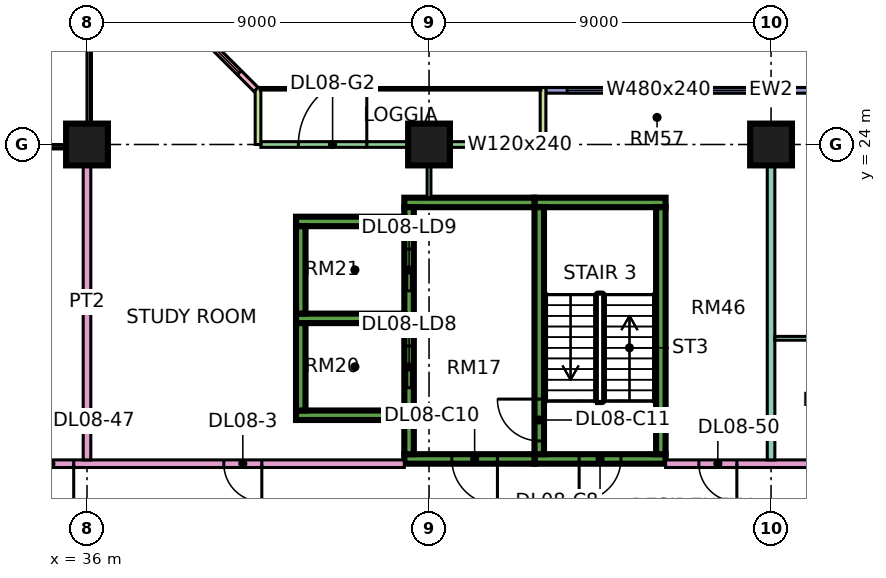
"""IFC4 building model, lengths in metres.
Left out: names, types, materials, properties, quantities, classifications, styles, units other than length and angle.
Written with IfcOpenShell. Run it as: python <this file> out.ifc"""

import sys

from ifc_helpers import new_model, si_unit, direction, frame, frame_2d, origin, origin_2d, place, context, subcontext, project, spatial, rectangle, extrude, element, fill, save


model = new_model("IFC4")
c1 = context("Model", 3, precision=1e-05, world=origin(), true_north=direction((0.0, 1.0)))
c2 = subcontext(c1, "Body", "Model", "MODEL_VIEW")
j1 = project(units=[si_unit("LENGTHUNIT", "METRE"), si_unit("PLANEANGLEUNIT", "RADIAN")], contexts=[c1])
p1 = place(None, origin())
s1 = spatial("IfcSite", under=j1, at=p1, CompositionType="ELEMENT")
p2 = place(p1, origin())
s2 = spatial("IfcBuilding", under=s1, at=p2, CompositionType="ELEMENT")
p3 = place(p2, frame((0.0, 0.0, 45.15)))
s3 = spatial("IfcBuildingStorey", under=s2, at=p3, CompositionType="ELEMENT", Elevation=45.15)
for number, where, z_axis, x_axis in (
    (1, (36.0, 24.0, 0.0), (0.0, 0.0, 1.0), (1.0, 0.0, 0.0)),
    (2, (45.0, 24.0, 0.0), (0.0, 0.0, 1.0), (1.0, 0.0, 0.0)),
    (3, (54.0, 24.0, 0.0), (0.0, 0.0, 1.0), (1.0, 0.0, 0.0)),
):
    element("IfcColumn", number, at=place(p3, frame(where, z_axis=z_axis, x_axis=x_axis)), inside=s3, PredefinedType="COLUMN", context=c2, shape_type="SweptSolid", body=[
        extrude(rectangle(XDim=1.1, YDim=1.1, at=origin_2d()), origin(), (0.0, 0.0, 1.0), 3.75),
    ])
p4 = place(p3, frame((47.775, 15.725, 0.0), z_axis=(0.0, 0.0, 1.0), x_axis=(1.0, 0.0, 0.0)))
e4 = element("IfcWall", 4, at=p4, inside=s3, PredefinedType="SHEAR", context=c2, shape_type="SweptSolid", body=[
    extrude(rectangle(XDim=3.45, YDim=0.25, at=frame_2d((1.725, 0.0))), origin(), (0.0, 0.0, 1.0), 3.75),
])
p5 = place(p4, frame((1.175, 0.0, 0.0)))
e5 = element("IfcOpeningElement", 5, at=p5, cuts=e4, PredefinedType="OPENING", context=c2, shape_type="SweptSolid", body=[
    extrude(rectangle(XDim=1.1, YDim=2.2, at=frame_2d((0.55, 1.1))), frame((0.0, 0.135, 0.0), z_axis=(0.0, -1.0, 0.0), x_axis=(1.0, 0.0, 0.0)), (0.0, 0.0, 1.0), 0.27),
])
p6 = place(p3, frame((47.775, 22.475, 0.0), z_axis=(0.0, 0.0, 1.0), x_axis=(1.0, 0.0, 0.0)))
e6 = element("IfcWall", 6, at=p6, inside=s3, PredefinedType="SHEAR", context=c2, shape_type="SweptSolid", body=[
    extrude(rectangle(XDim=3.45, YDim=0.25, at=frame_2d((1.725, 0.0))), origin(), (0.0, 0.0, 1.0), 3.75),
])
p7 = place(p3, frame((47.9, 15.85, 0.0), z_axis=(0.0, 0.0, 1.0), x_axis=(0.0, 1.0, 0.0)))
e7 = element("IfcWall", 7, at=p7, inside=s3, PredefinedType="SHEAR", context=c2, shape_type="SweptSolid", body=[
    extrude(rectangle(XDim=6.5, YDim=0.25, at=frame_2d((3.25, 0.0))), origin(), (0.0, 0.0, 1.0), 3.75),
])
p8 = place(p7, frame((0.35, 0.0, 0.0)))
e8 = element("IfcOpeningElement", 8, at=p8, cuts=e7, PredefinedType="OPENING", context=c2, shape_type="SweptSolid", body=[
    extrude(rectangle(XDim=1.1, YDim=2.2, at=frame_2d((0.55, 1.1))), frame((0.0, 0.135, 0.0), z_axis=(0.0, -1.0, 0.0), x_axis=(1.0, 0.0, 0.0)), (0.0, 0.0, 1.0), 0.27),
])
p9 = place(p3, frame((51.1, 15.85, 0.0), z_axis=(0.0, 0.0, 1.0), x_axis=(0.0, 1.0, 0.0)))
e9 = element("IfcWall", 9, at=p9, inside=s3, PredefinedType="SHEAR", context=c2, shape_type="SweptSolid", body=[
    extrude(rectangle(XDim=6.5, YDim=0.25, at=frame_2d((3.25, 0.0))), origin(), (0.0, 0.0, 1.0), 3.75),
])
p10 = place(p3, frame((44.35, 15.725, 0.0), z_axis=(0.0, 0.0, 1.0), x_axis=(1.0, 0.0, 0.0)))
e10 = element("IfcWall", 10, at=p10, inside=s3, PredefinedType="SHEAR", context=c2, shape_type="SweptSolid", body=[
    extrude(rectangle(XDim=3.425, YDim=0.25, at=frame_2d((1.712, 0.0))), origin(), (0.0, 0.0, 1.0), 3.75),
])
p11 = place(p10, frame((1.25, 0.0, 0.0)))
e11 = element("IfcOpeningElement", 11, at=p11, cuts=e10, PredefinedType="OPENING", context=c2, shape_type="SweptSolid", body=[
    extrude(rectangle(XDim=1.2, YDim=2.2, at=frame_2d((0.6, 1.1))), frame((0.0, 0.135, 0.0), z_axis=(0.0, -1.0, 0.0), x_axis=(1.0, 0.0, 0.0)), (0.0, 0.0, 1.0), 0.27),
])
p12 = place(p3, frame((44.35, 22.475, 0.0), z_axis=(0.0, 0.0, 1.0), x_axis=(1.0, 0.0, 0.0)))
e12 = element("IfcWall", 12, at=p12, inside=s3, PredefinedType="SHEAR", context=c2, shape_type="SweptSolid", body=[
    extrude(rectangle(XDim=3.425, YDim=0.25, at=frame_2d((1.712, 0.0))), origin(), (0.0, 0.0, 1.0), 3.75),
])
p13 = place(p3, frame((44.475, 15.85, 0.0), z_axis=(0.0, 0.0, 1.0), x_axis=(0.0, 1.0, 0.0)))
e13 = element("IfcWall", 13, at=p13, inside=s3, PredefinedType="SHEAR", context=c2, shape_type="SweptSolid", body=[
    extrude(rectangle(XDim=6.5, YDim=0.25, at=frame_2d((3.25, 0.0))), origin(), (0.0, 0.0, 1.0), 3.75),
])
p14 = place(p13, frame((1.75, 0.0, 0.0)))
e14 = element("IfcOpeningElement", 14, at=p14, cuts=e13, PredefinedType="OPENING", context=c2, shape_type="SweptSolid", body=[
    extrude(rectangle(XDim=1.1, YDim=2.2, at=frame_2d((0.55, 1.1))), frame((0.0, 0.135, 0.0), z_axis=(0.0, -1.0, 0.0), x_axis=(1.0, 0.0, 0.0)), (0.0, 0.0, 1.0), 0.27),
])
p15 = place(p13, frame((4.3, 0.0, 0.0)))
e15 = element("IfcOpeningElement", 15, at=p15, cuts=e13, PredefinedType="OPENING", context=c2, shape_type="SweptSolid", body=[
    extrude(rectangle(XDim=1.1, YDim=2.2, at=frame_2d((0.55, 1.1))), frame((0.0, 0.135, 0.0), z_axis=(0.0, -1.0, 0.0), x_axis=(1.0, 0.0, 0.0)), (0.0, 0.0, 1.0), 0.27),
])
for number, where, z_axis, x_axis in (
    (16, (41.5, 16.875, 0.0), (0.0, 0.0, 1.0), (1.0, 0.0, 0.0)),
    (17, (41.5, 19.425, 0.0), (0.0, 0.0, 1.0), (1.0, 0.0, 0.0)),
    (18, (41.5, 21.975, 0.0), (0.0, 0.0, 1.0), (1.0, 0.0, 0.0)),
):
    element("IfcWall", number, at=place(p3, frame(where, z_axis=z_axis, x_axis=x_axis)), inside=s3, PredefinedType="SHEAR", context=c2, shape_type="SweptSolid", body=[
        extrude(rectangle(XDim=2.85, YDim=0.25, at=frame_2d((1.425, 0.0))), origin(), (0.0, 0.0, 1.0), 3.75),
    ])
for number, where, z_axis, x_axis in (
    (19, (41.625, 17.0, 0.0), (0.0, 0.0, 1.0), (0.0, 1.0, 0.0)),
    (20, (41.625, 19.55, 0.0), (0.0, 0.0, 1.0), (0.0, 1.0, 0.0)),
):
    element("IfcWall", number, at=place(p3, frame(where, z_axis=z_axis, x_axis=x_axis)), inside=s3, PredefinedType="SHEAR", context=c2, shape_type="SweptSolid", body=[
        extrude(rectangle(XDim=2.3, YDim=0.25, at=frame_2d((1.15, 0.0))), origin(), (0.0, 0.0, 1.0), 3.75),
    ])
p16 = place(p3, frame((59.925, 25.425, 0.0), z_axis=(0.0, 0.0, 1.0), x_axis=(-1.0, 0.0, 0.0)))
e21 = element("IfcWall", 21, at=p16, inside=s3, PredefinedType="SOLIDWALL", context=c2, shape_type="SweptSolid", body=[
    extrude(rectangle(XDim=11.85, YDim=0.15, at=frame_2d((5.925, 0.0))), origin(), (0.0, 0.0, 1.0), 3.35),
])
p17 = place(p16, frame((1.462, 0.0, 0.45)))
e22 = element("IfcOpeningElement", 22, at=p17, cuts=e21, PredefinedType="OPENING", context=c2, shape_type="SweptSolid", body=[
    extrude(rectangle(XDim=3.0, YDim=2.4, at=frame_2d((1.5, 1.2))), frame((0.0, 0.085, 0.0), z_axis=(0.0, -1.0, 0.0), x_axis=(1.0, 0.0, 0.0)), (0.0, 0.0, 1.0), 0.17),
])
p18 = place(p16, frame((6.488, 0.0, 0.45)))
e23 = element("IfcOpeningElement", 23, at=p18, cuts=e21, PredefinedType="OPENING", context=c2, shape_type="SweptSolid", body=[
    extrude(rectangle(XDim=4.8, YDim=2.4, at=frame_2d((2.4, 1.2))), frame((0.0, 0.085, 0.0), z_axis=(0.0, -1.0, 0.0), x_axis=(1.0, 0.0, 0.0)), (0.0, 0.0, 1.0), 0.17),
])
p19 = place(p3, frame((47.925, 24.0, 0.0), z_axis=(0.0, 0.0, 1.0), x_axis=(-1.0, 0.0, 0.0)))
e24 = element("IfcWall", 24, at=p19, inside=s3, PredefinedType="SOLIDWALL", context=c2, shape_type="SweptSolid", body=[
    extrude(rectangle(XDim=7.35, YDim=0.15, at=frame_2d((3.675, 0.0))), origin(), (0.0, 0.0, 1.0), 3.35),
])
p20 = place(p19, frame((0.538, 0.0, 0.45)))
e25 = element("IfcOpeningElement", 25, at=p20, cuts=e24, PredefinedType="OPENING", context=c2, shape_type="SweptSolid", body=[
    extrude(rectangle(XDim=1.2, YDim=2.4, at=frame_2d((0.6, 1.2))), frame((0.0, 0.085, 0.0), z_axis=(0.0, -1.0, 0.0), x_axis=(1.0, 0.0, 0.0)), (0.0, 0.0, 1.0), 0.17),
])
p21 = place(p19, frame((4.562, 0.0, 0.0)))
e26 = element("IfcOpeningElement", 26, at=p21, cuts=e24, PredefinedType="OPENING", context=c2, shape_type="SweptSolid", body=[
    extrude(rectangle(XDim=1.8, YDim=2.4, at=frame_2d((0.9, 1.2))), frame((0.0, 0.085, 0.0), z_axis=(0.0, -1.0, 0.0), x_axis=(1.0, 0.0, 0.0)), (0.0, 0.0, 1.0), 0.17),
])
for number, where, z_axis, x_axis in (
    (27, (48.0, 25.5, 0.0), (0.0, 0.0, 1.0), (0.0, -1.0, 0.0)),
    (28, (40.5, 25.5, 0.0), (0.0, 0.0, 1.0), (0.0, -1.0, 0.0)),
):
    element("IfcWall", number, at=place(p3, frame(where, z_axis=z_axis, x_axis=x_axis)), inside=s3, PredefinedType="SOLIDWALL", context=c2, shape_type="SweptSolid", body=[
        extrude(rectangle(XDim=1.5, YDim=0.15, at=frame_2d((0.75, 0.0))), origin(), (0.0, 0.0, 1.0), 3.35),
    ])
p22 = place(p3, frame((40.447, 25.447, 0.0), z_axis=(0.0, 0.0, 1.0), x_axis=(-0.707106781187, 0.707106781187, 0.0)))
e29 = element("IfcWall", 29, at=p22, inside=s3, PredefinedType="SOLIDWALL", context=c2, shape_type="SweptSolid", body=[
    extrude(rectangle(XDim=4.243, YDim=0.15, at=frame_2d((2.121, 0.0))), origin(), (0.0, 0.0, 1.0), 3.35),
])
p23 = place(p22, frame((0.621, 0.0, 0.45)))
e30 = element("IfcOpeningElement", 30, at=p23, cuts=e29, PredefinedType="OPENING", context=c2, shape_type="SweptSolid", body=[
    extrude(rectangle(XDim=3.0, YDim=2.4, at=frame_2d((1.5, 1.2))), frame((0.0, 0.085, 0.0), z_axis=(0.0, -1.0, 0.0), x_axis=(1.0, 0.0, 0.0)), (0.0, 0.0, 1.0), 0.17),
])
p24 = place(p3, frame((34.0, 15.6, 0.0), z_axis=(0.0, 0.0, 1.0), x_axis=(1.0, 0.0, 0.0)))
e31 = element("IfcWall", 31, at=p24, inside=s3, PredefinedType="PARTITIONING", context=c2, shape_type="SweptSolid", body=[
    extrude(rectangle(XDim=10.35, YDim=0.2, at=frame_2d((5.175, 0.0))), origin(), (0.0, 0.0, 1.0), 3.35),
])
p25 = place(p24, frame((5.6, 0.0, 0.0)))
e32 = element("IfcOpeningElement", 32, at=p25, cuts=e31, PredefinedType="OPENING", context=c2, shape_type="SweptSolid", body=[
    extrude(rectangle(XDim=1.0, YDim=2.1, at=frame_2d((0.5, 1.05))), frame((0.0, 0.11, 0.0), z_axis=(0.0, -1.0, 0.0), x_axis=(1.0, 0.0, 0.0)), (0.0, 0.0, 1.0), 0.22),
])
p26 = place(p24, frame((0.45, 0.0, 0.0)))
e33 = element("IfcOpeningElement", 33, at=p26, cuts=e31, PredefinedType="OPENING", context=c2, shape_type="SweptSolid", body=[
    extrude(rectangle(XDim=1.2, YDim=2.1, at=frame_2d((0.6, 1.05))), frame((0.0, 0.11, 0.0), z_axis=(0.0, -1.0, 0.0), x_axis=(1.0, 0.0, 0.0)), (0.0, 0.0, 1.0), 0.22),
])
p27 = place(p3, frame((36.0, 15.7, 0.0), z_axis=(0.0, 0.0, 1.0), x_axis=(0.0, 1.0, 0.0)))
e34 = element("IfcWall", 34, at=p27, inside=s3, PredefinedType="PARTITIONING", context=c2, shape_type="SweptSolid", body=[
    extrude(rectangle(XDim=8.3, YDim=0.2, at=frame_2d((4.15, 0.0))), origin(), (0.0, 0.0, 1.0), 3.35),
])
p28 = place(p3, frame((45.0, 22.6, 0.0), z_axis=(0.0, 0.0, 1.0), x_axis=(0.0, 1.0, 0.0)))
e35 = element("IfcWall", 35, at=p28, inside=s3, PredefinedType="PARTITIONING", context=c2, shape_type="SweptSolid", body=[
    extrude(rectangle(XDim=1.326, YDim=0.1, at=frame_2d((0.663, 0.0))), origin(), (0.0, 0.0, 1.0), 3.35),
])
p29 = place(p3, frame((51.225, 15.6, 0.0), z_axis=(0.0, 0.0, 1.0), x_axis=(1.0, 0.0, 0.0)))
e36 = element("IfcWall", 36, at=p29, inside=s3, PredefinedType="PARTITIONING", context=c2, shape_type="SweptSolid", body=[
    extrude(rectangle(XDim=20.701, YDim=0.2, at=frame_2d((10.351, 0.0))), origin(), (0.0, 0.0, 1.0), 3.35),
])
p30 = place(p29, frame((9.875, 0.0, 0.0)))
e37 = element("IfcOpeningElement", 37, at=p30, cuts=e36, PredefinedType="OPENING", context=c2, shape_type="SweptSolid", body=[
    extrude(rectangle(XDim=1.0, YDim=2.1, at=frame_2d((0.5, 1.05))), frame((0.0, 0.11, 0.0), z_axis=(0.0, -1.0, 0.0), x_axis=(1.0, 0.0, 0.0)), (0.0, 0.0, 1.0), 0.22),
])
p31 = place(p29, frame((0.875, 0.0, 0.0)))
e38 = element("IfcOpeningElement", 38, at=p31, cuts=e36, PredefinedType="OPENING", context=c2, shape_type="SweptSolid", body=[
    extrude(rectangle(XDim=1.0, YDim=2.1, at=frame_2d((0.5, 1.05))), frame((0.0, 0.11, 0.0), z_axis=(0.0, -1.0, 0.0), x_axis=(1.0, 0.0, 0.0)), (0.0, 0.0, 1.0), 0.22),
])
p32 = place(p3, frame((54.0, 15.7, 0.0), z_axis=(0.0, 0.0, 1.0), x_axis=(0.0, 1.0, 0.0)))
e39 = element("IfcWall", 39, at=p32, inside=s3, PredefinedType="PARTITIONING", context=c2, shape_type="SweptSolid", body=[
    extrude(rectangle(XDim=8.3, YDim=0.2, at=frame_2d((4.15, 0.0))), origin(), (0.0, 0.0, 1.0), 3.35),
])
p33 = place(p3, frame((54.1, 18.9, 0.0), z_axis=(0.0, 0.0, 1.0), x_axis=(1.0, 0.0, 0.0)))
e40 = element("IfcWall", 40, at=p33, inside=s3, PredefinedType="PARTITIONING", context=c2, shape_type="SweptSolid", body=[
    extrude(rectangle(XDim=5.65, YDim=0.1, at=frame_2d((2.825, 0.0))), origin(), (0.0, 0.0, 1.0), 3.35),
])
p34 = place(p18, origin())
e41 = element("IfcWindow", 41, at=p34, inside=s3, PartitioningType="SINGLE_PANEL", PredefinedType="WINDOW", context=c2, shape_type="SweptSolid", body=[
    extrude(rectangle(XDim=4.8, YDim=2.4, at=frame_2d((2.4, 1.2))), frame((0.0, 0.03, 0.0), z_axis=(0.0, -1.0, 0.0), x_axis=(1.0, 0.0, 0.0)), (0.0, 0.0, 1.0), 0.06),
])
fill(e23, e41)
p35 = place(p20, origin())
e42 = element("IfcWindow", 42, at=p35, inside=s3, PartitioningType="SINGLE_PANEL", PredefinedType="WINDOW", context=c2, shape_type="SweptSolid", body=[
    extrude(rectangle(XDim=1.2, YDim=2.4, at=frame_2d((0.6, 1.2))), frame((0.0, 0.03, 0.0), z_axis=(0.0, -1.0, 0.0), x_axis=(1.0, 0.0, 0.0)), (0.0, 0.0, 1.0), 0.06),
])
fill(e25, e42)
p36 = place(p21, frame((1.8, 0.0, 0.0), z_axis=(0.0, 0.0, 1.0), x_axis=(-1.0, 0.0, 0.0)))
e43 = element("IfcDoor", 43, at=p36, inside=s3, OperationType="DOUBLE_DOOR_SINGLE_SWING", PredefinedType="DOOR", context=c2, shape_type="SweptSolid", body=[
    extrude(rectangle(XDim=1.8, YDim=2.4, at=frame_2d((0.9, 1.2))), frame((0.0, 0.025, 0.0), z_axis=(0.0, -1.0, 0.0), x_axis=(1.0, 0.0, 0.0)), (0.0, 0.0, 1.0), 0.05),
])
fill(e26, e43)
p37 = place(p23, origin())
e44 = element("IfcWindow", 44, at=p37, inside=s3, PartitioningType="SINGLE_PANEL", PredefinedType="WINDOW", context=c2, shape_type="SweptSolid", body=[
    extrude(rectangle(XDim=3.0, YDim=2.4, at=frame_2d((1.5, 1.2))), frame((0.0, 0.03, 0.0), z_axis=(0.0, -1.0, 0.0), x_axis=(1.0, 0.0, 0.0)), (0.0, 0.0, 1.0), 0.06),
])
fill(e30, e44)
p38 = place(p5, frame((1.1, 0.0, 0.0), z_axis=(0.0, 0.0, 1.0), x_axis=(-1.0, 0.0, 0.0)))
e45 = element("IfcDoor", 45, at=p38, inside=s3, OperationType="SINGLE_SWING_LEFT", PredefinedType="DOOR", context=c2, shape_type="SweptSolid", body=[
    extrude(rectangle(XDim=1.1, YDim=2.2, at=frame_2d((0.55, 1.1))), frame((0.0, 0.025, 0.0), z_axis=(0.0, -1.0, 0.0), x_axis=(1.0, 0.0, 0.0)), (0.0, 0.0, 1.0), 0.05),
])
fill(e5, e45)
p39 = place(p11, origin())
e46 = element("IfcDoor", 46, at=p39, inside=s3, OperationType="SINGLE_SWING_RIGHT", PredefinedType="DOOR", context=c2, shape_type="SweptSolid", body=[
    extrude(rectangle(XDim=1.2, YDim=2.2, at=frame_2d((0.6, 1.1))), frame((0.0, 0.025, 0.0), z_axis=(0.0, -1.0, 0.0), x_axis=(1.0, 0.0, 0.0)), (0.0, 0.0, 1.0), 0.05),
])
fill(e11, e46)
p40 = place(p8, frame((1.1, 0.0, 0.0), z_axis=(0.0, 0.0, 1.0), x_axis=(-1.0, 0.0, 0.0)))
e47 = element("IfcDoor", 47, at=p40, inside=s3, OperationType="SINGLE_SWING_RIGHT", PredefinedType="DOOR", context=c2, shape_type="SweptSolid", body=[
    extrude(rectangle(XDim=1.1, YDim=2.2, at=frame_2d((0.55, 1.1))), frame((0.0, 0.025, 0.0), z_axis=(0.0, -1.0, 0.0), x_axis=(1.0, 0.0, 0.0)), (0.0, 0.0, 1.0), 0.05),
])
fill(e8, e47)
p41 = place(p14, origin())
e48 = element("IfcDoor", 48, at=p41, inside=s3, OperationType="DOUBLE_DOOR_SLIDING", PredefinedType="DOOR", context=c2, shape_type="SweptSolid", body=[
    extrude(rectangle(XDim=1.1, YDim=2.2, at=frame_2d((0.55, 1.1))), frame((0.0, 0.025, 0.0), z_axis=(0.0, -1.0, 0.0), x_axis=(1.0, 0.0, 0.0)), (0.0, 0.0, 1.0), 0.05),
])
fill(e14, e48)
p42 = place(p15, origin())
e49 = element("IfcDoor", 49, at=p42, inside=s3, OperationType="DOUBLE_DOOR_SLIDING", PredefinedType="DOOR", context=c2, shape_type="SweptSolid", body=[
    extrude(rectangle(XDim=1.1, YDim=2.2, at=frame_2d((0.55, 1.1))), frame((0.0, 0.025, 0.0), z_axis=(0.0, -1.0, 0.0), x_axis=(1.0, 0.0, 0.0)), (0.0, 0.0, 1.0), 0.05),
])
fill(e15, e49)
p43 = place(p25, origin())
e50 = element("IfcDoor", 50, at=p43, inside=s3, OperationType="SINGLE_SWING_RIGHT", PredefinedType="DOOR", context=c2, shape_type="SweptSolid", body=[
    extrude(rectangle(XDim=1.0, YDim=2.1, at=frame_2d((0.5, 1.05))), frame((0.0, 0.025, 0.0), z_axis=(0.0, -1.0, 0.0), x_axis=(1.0, 0.0, 0.0)), (0.0, 0.0, 1.0), 0.05),
])
fill(e32, e50)
p44 = place(p26, origin())
e51 = element("IfcDoor", 51, at=p44, inside=s3, OperationType="SINGLE_SWING_RIGHT", PredefinedType="DOOR", context=c2, shape_type="SweptSolid", body=[
    extrude(rectangle(XDim=1.2, YDim=2.1, at=frame_2d((0.6, 1.05))), frame((0.0, 0.025, 0.0), z_axis=(0.0, -1.0, 0.0), x_axis=(1.0, 0.0, 0.0)), (0.0, 0.0, 1.0), 0.05),
])
fill(e33, e51)
p45 = place(p31, origin())
e52 = element("IfcDoor", 52, at=p45, inside=s3, OperationType="SINGLE_SWING_RIGHT", PredefinedType="DOOR", context=c2, shape_type="SweptSolid", body=[
    extrude(rectangle(XDim=1.0, YDim=2.1, at=frame_2d((0.5, 1.05))), frame((0.0, 0.025, 0.0), z_axis=(0.0, -1.0, 0.0), x_axis=(1.0, 0.0, 0.0)), (0.0, 0.0, 1.0), 0.05),
])
fill(e38, e52)
save(model, sys.argv[1])
